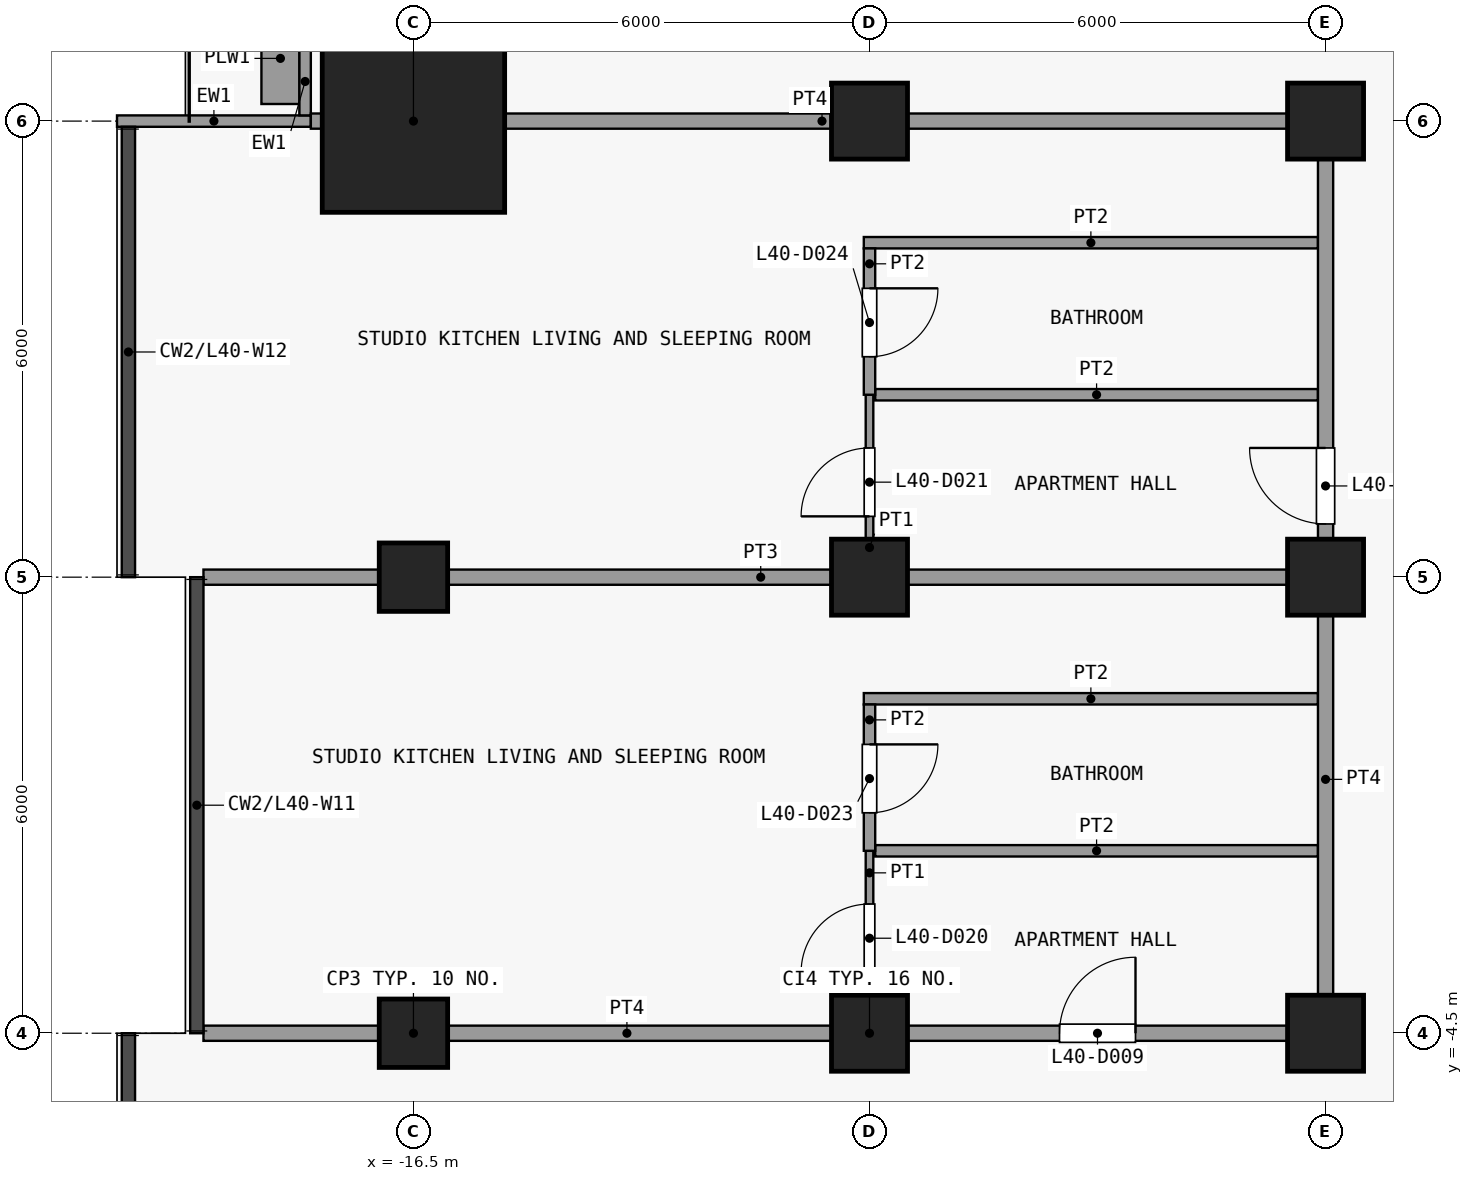
"""IFC4 building model, lengths in metres.
Left out: names, types, materials, properties, quantities, classifications, styles, units other than length and angle.
Written with IfcOpenShell. Run it as: python <this file> out.ifc"""

import sys

from ifc_helpers import new_model, si_unit, direction, frame, frame_2d, origin, origin_2d, place, context, subcontext, project, spatial, rectangle, extrude, element, fill, save


model = new_model("IFC4")
c1 = context("Model", 3, precision=1e-05, world=origin(), true_north=direction((0.0, 1.0)))
c2 = subcontext(c1, "Body", "Model", "MODEL_VIEW")
j1 = project(units=[si_unit("LENGTHUNIT", "METRE"), si_unit("PLANEANGLEUNIT", "RADIAN")], contexts=[c1])
p1 = place(None, origin())
s1 = spatial("IfcSite", under=j1, at=p1, CompositionType="ELEMENT")
p2 = place(p1, origin())
s2 = spatial("IfcBuilding", under=s1, at=p2, CompositionType="ELEMENT")
p3 = place(p2, frame((0.0, 0.0, 163.7)))
s3 = spatial("IfcBuildingStorey", under=s2, at=p3, CompositionType="ELEMENT", Elevation=163.7)
for number, where, z_axis, x_axis in (
    (1, (-16.5, -4.5, 0.0), (0.0, 0.0, 1.0), (1.0, 0.0, 0.0)),
    (2, (-16.5, 1.5, 0.0), (0.0, 0.0, 1.0), (1.0, 0.0, 0.0)),
):
    element("IfcColumn", number, at=place(p3, frame(where, z_axis=z_axis, x_axis=x_axis)), inside=s3, PredefinedType="COLUMN", context=c2, shape_type="SweptSolid", body=[
        extrude(rectangle(XDim=0.9, YDim=0.9, at=origin_2d()), origin(), (0.0, 0.0, 1.0), 3.6),
    ])
p4 = place(p3, frame((-16.5, 7.5, 0.0), z_axis=(0.0, 0.0, 1.0), x_axis=(1.0, 0.0, 0.0)))
e3 = element("IfcColumn", 3, at=p4, inside=s3, PredefinedType="COLUMN", context=c2, shape_type="SweptSolid", body=[
    extrude(rectangle(XDim=2.4, YDim=2.4, at=origin_2d()), origin(), (0.0, 0.0, 1.0), 3.6),
])
for number, where, z_axis, x_axis in (
    (4, (-10.5, -4.5, 0.0), (0.0, 0.0, 1.0), (1.0, 0.0, 0.0)),
    (5, (-10.5, 1.5, 0.0), (0.0, 0.0, 1.0), (1.0, 0.0, 0.0)),
    (6, (-10.5, 7.5, 0.0), (0.0, 0.0, 1.0), (1.0, 0.0, 0.0)),
    (7, (-4.5, -4.5, 0.0), (0.0, 0.0, 1.0), (1.0, 0.0, 0.0)),
    (8, (-4.5, 1.5, 0.0), (0.0, 0.0, 1.0), (1.0, 0.0, 0.0)),
    (9, (-4.5, 7.5, 0.0), (0.0, 0.0, 1.0), (1.0, 0.0, 0.0)),
):
    element("IfcColumn", number, at=place(p3, frame(where, z_axis=z_axis, x_axis=x_axis)), inside=s3, PredefinedType="COLUMN", context=c2, shape_type="SweptSolid", body=[
        extrude(rectangle(XDim=1.0, YDim=1.0, at=origin_2d()), origin(), (0.0, 0.0, 1.0), 3.6),
    ])
p5 = place(p3, frame((-17.85, 7.5, 0.0), z_axis=(0.0, 0.0, 1.0), x_axis=(-1.0, 0.0, 0.0)))
e10 = element("IfcWall", 10, at=p5, inside=s3, PredefinedType="SOLIDWALL", context=c2, shape_type="SweptSolid", body=[
    extrude(rectangle(XDim=2.55, YDim=0.15, at=frame_2d((1.275, 0.0))), origin(), (0.0, 0.0, 1.0), 3.3),
])
p6 = place(p3, frame((-17.925, 7.575, 0.0), z_axis=(0.0, 0.0, 1.0), x_axis=(0.0, 1.0, 0.0)))
e11 = element("IfcWall", 11, at=p6, inside=s3, PredefinedType="SOLIDWALL", context=c2, shape_type="SweptSolid", body=[
    extrude(rectangle(XDim=5.85, YDim=0.15, at=frame_2d((2.925, 0.0))), origin(), (0.0, 0.0, 1.0), 3.3),
])
p7 = place(p6, frame((3.825, 0.0, 0.0)))
e12 = element("IfcOpeningElement", 12, at=p7, cuts=e11, PredefinedType="OPENING", context=c2, shape_type="SweptSolid", body=[
    extrude(rectangle(XDim=1.2, YDim=2.4, at=frame_2d((0.6, 1.2))), frame((0.0, 0.085, 0.0), z_axis=(0.0, -1.0, 0.0), x_axis=(1.0, 0.0, 0.0)), (0.0, 0.0, 1.0), 0.17),
])
p8 = place(p6, frame((1.012, 0.0, 0.9)))
e13 = element("IfcOpeningElement", 13, at=p8, cuts=e11, PredefinedType="OPENING", context=c2, shape_type="SweptSolid", body=[
    extrude(rectangle(XDim=1.8, YDim=2.1, at=frame_2d((0.9, 1.05))), frame((0.0, 0.085, 0.0), z_axis=(0.0, -1.0, 0.0), x_axis=(1.0, 0.0, 0.0)), (0.0, 0.0, 1.0), 0.17),
])
p9 = place(p3, frame((-18.25, 7.725, 0.0), z_axis=(0.0, 0.0, 1.0), x_axis=(0.0, 1.0, 0.0)))
e14 = element("IfcWall", 14, at=p9, inside=s3, PredefinedType="USERDEFINED", context=c2, shape_type="SweptSolid", body=[
    extrude(rectangle(XDim=1.2, YDim=0.5, at=frame_2d((0.6, 0.0))), origin(), (0.0, 0.0, 1.0), 0.9),
])
p10 = place(p3, frame((-19.262, -4.5, 0.0), z_axis=(0.0, 0.0, 1.0), x_axis=(1.0, 0.0, 0.0)))
e15 = element("IfcWall", 15, at=p10, inside=s3, PredefinedType="PARTITIONING", context=c2, shape_type="SweptSolid", body=[
    extrude(rectangle(XDim=14.863, YDim=0.2, at=frame_2d((7.431, 0.0))), origin(), (0.0, 0.0, 1.0), 3.3),
])
p11 = place(p10, frame((11.262, 0.0, 0.0)))
e16 = element("IfcOpeningElement", 16, at=p11, cuts=e15, PredefinedType="OPENING", context=c2, shape_type="SweptSolid", body=[
    extrude(rectangle(XDim=1.0, YDim=2.1, at=frame_2d((0.5, 1.05))), frame((0.0, 0.11, 0.0), z_axis=(0.0, -1.0, 0.0), x_axis=(1.0, 0.0, 0.0)), (0.0, 0.0, 1.0), 0.22),
])
p12 = place(p3, frame((-10.425, -2.1, 0.0), z_axis=(0.0, 0.0, 1.0), x_axis=(1.0, 0.0, 0.0)))
e17 = element("IfcWall", 17, at=p12, inside=s3, PredefinedType="PARTITIONING", context=c2, shape_type="SweptSolid", body=[
    extrude(rectangle(XDim=5.825, YDim=0.15, at=frame_2d((2.913, 0.0))), origin(), (0.0, 0.0, 1.0), 3.3),
])
p13 = place(p3, frame((-10.575, -0.1, 0.0), z_axis=(0.0, 0.0, 1.0), x_axis=(1.0, 0.0, 0.0)))
e18 = element("IfcWall", 18, at=p13, inside=s3, PredefinedType="PARTITIONING", context=c2, shape_type="SweptSolid", body=[
    extrude(rectangle(XDim=5.975, YDim=0.15, at=frame_2d((2.987, 0.0))), origin(), (0.0, 0.0, 1.0), 3.3),
])
p14 = place(p3, frame((-19.262, 1.5, 0.0), z_axis=(0.0, 0.0, 1.0), x_axis=(1.0, 0.0, 0.0)))
e19 = element("IfcWall", 19, at=p14, inside=s3, PredefinedType="PARTITIONING", context=c2, shape_type="SweptSolid", body=[
    extrude(rectangle(XDim=14.662, YDim=0.2, at=frame_2d((7.331, 0.0))), origin(), (0.0, 0.0, 1.0), 3.3),
])
p15 = place(p3, frame((-10.425, 3.9, 0.0), z_axis=(0.0, 0.0, 1.0), x_axis=(1.0, 0.0, 0.0)))
e20 = element("IfcWall", 20, at=p15, inside=s3, PredefinedType="PARTITIONING", context=c2, shape_type="SweptSolid", body=[
    extrude(rectangle(XDim=5.825, YDim=0.15, at=frame_2d((2.913, 0.0))), origin(), (0.0, 0.0, 1.0), 3.3),
])
p16 = place(p3, frame((-10.575, 5.9, 0.0), z_axis=(0.0, 0.0, 1.0), x_axis=(1.0, 0.0, 0.0)))
e21 = element("IfcWall", 21, at=p16, inside=s3, PredefinedType="PARTITIONING", context=c2, shape_type="SweptSolid", body=[
    extrude(rectangle(XDim=5.975, YDim=0.15, at=frame_2d((2.987, 0.0))), origin(), (0.0, 0.0, 1.0), 3.3),
])
p17 = place(p3, frame((-17.85, 7.5, 0.0), z_axis=(0.0, 0.0, 1.0), x_axis=(1.0, 0.0, 0.0)))
e22 = element("IfcWall", 22, at=p17, inside=s3, PredefinedType="PARTITIONING", context=c2, shape_type="SweptSolid", body=[
    extrude(rectangle(XDim=13.45, YDim=0.2, at=frame_2d((6.725, 0.0))), origin(), (0.0, 0.0, 1.0), 3.3),
])
p18 = place(p3, frame((-10.5, -4.4, 0.0), z_axis=(0.0, 0.0, 1.0), x_axis=(0.0, 1.0, 0.0)))
e23 = element("IfcWall", 23, at=p18, inside=s3, PredefinedType="PARTITIONING", context=c2, shape_type="SweptSolid", body=[
    extrude(rectangle(XDim=2.3, YDim=0.1, at=frame_2d((1.15, 0.0))), origin(), (0.0, 0.0, 1.0), 3.3),
])
p19 = place(p18, frame((0.7, 0.0, 0.0)))
e24 = element("IfcOpeningElement", 24, at=p19, cuts=e23, PredefinedType="OPENING", context=c2, shape_type="SweptSolid", body=[
    extrude(rectangle(XDim=0.9, YDim=2.1, at=frame_2d((0.45, 1.05))), frame((0.0, 0.06, 0.0), z_axis=(0.0, -1.0, 0.0), x_axis=(1.0, 0.0, 0.0)), (0.0, 0.0, 1.0), 0.12),
])
p20 = place(p3, frame((-10.5, 1.6, 0.0), z_axis=(0.0, 0.0, 1.0), x_axis=(0.0, 1.0, 0.0)))
e25 = element("IfcWall", 25, at=p20, inside=s3, PredefinedType="PARTITIONING", context=c2, shape_type="SweptSolid", body=[
    extrude(rectangle(XDim=2.3, YDim=0.1, at=frame_2d((1.15, 0.0))), origin(), (0.0, 0.0, 1.0), 3.3),
])
p21 = place(p20, frame((0.7, 0.0, 0.0)))
e26 = element("IfcOpeningElement", 26, at=p21, cuts=e25, PredefinedType="OPENING", context=c2, shape_type="SweptSolid", body=[
    extrude(rectangle(XDim=0.9, YDim=2.1, at=frame_2d((0.45, 1.05))), frame((0.0, 0.06, 0.0), z_axis=(0.0, -1.0, 0.0), x_axis=(1.0, 0.0, 0.0)), (0.0, 0.0, 1.0), 0.12),
])
p22 = place(p3, frame((-10.5, -2.1, 0.0), z_axis=(0.0, 0.0, 1.0), x_axis=(0.0, 1.0, 0.0)))
e27 = element("IfcWall", 27, at=p22, inside=s3, PredefinedType="PARTITIONING", context=c2, shape_type="SweptSolid", body=[
    extrude(rectangle(XDim=1.925, YDim=0.15, at=frame_2d((0.962, 0.0))), origin(), (0.0, 0.0, 1.0), 3.3),
])
p23 = place(p22, frame((0.5, 0.0, 0.0)))
e28 = element("IfcOpeningElement", 28, at=p23, cuts=e27, PredefinedType="OPENING", context=c2, shape_type="SweptSolid", body=[
    extrude(rectangle(XDim=0.9, YDim=2.1, at=frame_2d((0.45, 1.05))), frame((0.0, 0.085, 0.0), z_axis=(0.0, -1.0, 0.0), x_axis=(1.0, 0.0, 0.0)), (0.0, 0.0, 1.0), 0.17),
])
p24 = place(p3, frame((-10.5, 3.9, 0.0), z_axis=(0.0, 0.0, 1.0), x_axis=(0.0, 1.0, 0.0)))
e29 = element("IfcWall", 29, at=p24, inside=s3, PredefinedType="PARTITIONING", context=c2, shape_type="SweptSolid", body=[
    extrude(rectangle(XDim=1.925, YDim=0.15, at=frame_2d((0.962, 0.0))), origin(), (0.0, 0.0, 1.0), 3.3),
])
p25 = place(p24, frame((0.5, 0.0, 0.0)))
e30 = element("IfcOpeningElement", 30, at=p25, cuts=e29, PredefinedType="OPENING", context=c2, shape_type="SweptSolid", body=[
    extrude(rectangle(XDim=0.9, YDim=2.1, at=frame_2d((0.45, 1.05))), frame((0.0, 0.085, 0.0), z_axis=(0.0, -1.0, 0.0), x_axis=(1.0, 0.0, 0.0)), (0.0, 0.0, 1.0), 0.17),
])
p26 = place(p3, frame((-4.5, -4.4, 0.0), z_axis=(0.0, 0.0, 1.0), x_axis=(0.0, 1.0, 0.0)))
e31 = element("IfcWall", 31, at=p26, inside=s3, PredefinedType="PARTITIONING", context=c2, shape_type="SweptSolid", body=[
    extrude(rectangle(XDim=11.8, YDim=0.2, at=frame_2d((5.9, 0.0))), origin(), (0.0, 0.0, 1.0), 3.3),
])
p27 = place(p26, frame((6.6, 0.0, 0.0)))
e32 = element("IfcOpeningElement", 32, at=p27, cuts=e31, PredefinedType="OPENING", context=c2, shape_type="SweptSolid", body=[
    extrude(rectangle(XDim=1.0, YDim=2.1, at=frame_2d((0.5, 1.05))), frame((0.0, 0.11, 0.0), z_axis=(0.0, -1.0, 0.0), x_axis=(1.0, 0.0, 0.0)), (0.0, 0.0, 1.0), 0.22),
])
p28 = place(p11, origin())
e33 = element("IfcDoor", 33, at=p28, inside=s3, OperationType="SINGLE_SWING_LEFT", PredefinedType="DOOR", context=c2, shape_type="SweptSolid", body=[
    extrude(rectangle(XDim=1.0, YDim=2.1, at=frame_2d((0.5, 1.05))), frame((0.0, 0.025, 0.0), z_axis=(0.0, -1.0, 0.0), x_axis=(1.0, 0.0, 0.0)), (0.0, 0.0, 1.0), 0.05),
])
fill(e16, e33)
p29 = place(p19, origin())
e34 = element("IfcDoor", 34, at=p29, inside=s3, OperationType="SINGLE_SWING_RIGHT", PredefinedType="DOOR", context=c2, shape_type="SweptSolid", body=[
    extrude(rectangle(XDim=0.9, YDim=2.1, at=frame_2d((0.45, 1.05))), frame((0.0, 0.025, 0.0), z_axis=(0.0, -1.0, 0.0), x_axis=(1.0, 0.0, 0.0)), (0.0, 0.0, 1.0), 0.05),
])
fill(e24, e34)
p30 = place(p21, origin())
e35 = element("IfcDoor", 35, at=p30, inside=s3, OperationType="SINGLE_SWING_RIGHT", PredefinedType="DOOR", context=c2, shape_type="SweptSolid", body=[
    extrude(rectangle(XDim=0.9, YDim=2.1, at=frame_2d((0.45, 1.05))), frame((0.0, 0.025, 0.0), z_axis=(0.0, -1.0, 0.0), x_axis=(1.0, 0.0, 0.0)), (0.0, 0.0, 1.0), 0.05),
])
fill(e26, e35)
p31 = place(p23, origin())
e36 = element("IfcDoor", 36, at=p31, inside=s3, OperationType="SINGLE_SWING_RIGHT", PredefinedType="DOOR", context=c2, shape_type="SweptSolid", body=[
    extrude(rectangle(XDim=0.9, YDim=2.1, at=frame_2d((0.45, 1.05))), frame((0.0, 0.025, 0.0), z_axis=(0.0, -1.0, 0.0), x_axis=(1.0, 0.0, 0.0)), (0.0, 0.0, 1.0), 0.05),
])
fill(e28, e36)
p32 = place(p25, origin())
e37 = element("IfcDoor", 37, at=p32, inside=s3, OperationType="SINGLE_SWING_RIGHT", PredefinedType="DOOR", context=c2, shape_type="SweptSolid", body=[
    extrude(rectangle(XDim=0.9, YDim=2.1, at=frame_2d((0.45, 1.05))), frame((0.0, 0.025, 0.0), z_axis=(0.0, -1.0, 0.0), x_axis=(1.0, 0.0, 0.0)), (0.0, 0.0, 1.0), 0.05),
])
fill(e30, e37)
p33 = place(p27, origin())
e38 = element("IfcDoor", 38, at=p33, inside=s3, OperationType="SINGLE_SWING_LEFT", PredefinedType="DOOR", context=c2, shape_type="SweptSolid", body=[
    extrude(rectangle(XDim=1.0, YDim=2.1, at=frame_2d((0.5, 1.05))), frame((0.0, 0.025, 0.0), z_axis=(0.0, -1.0, 0.0), x_axis=(1.0, 0.0, 0.0)), (0.0, 0.0, 1.0), 0.05),
])
fill(e32, e38)
save(model, sys.argv[1])
